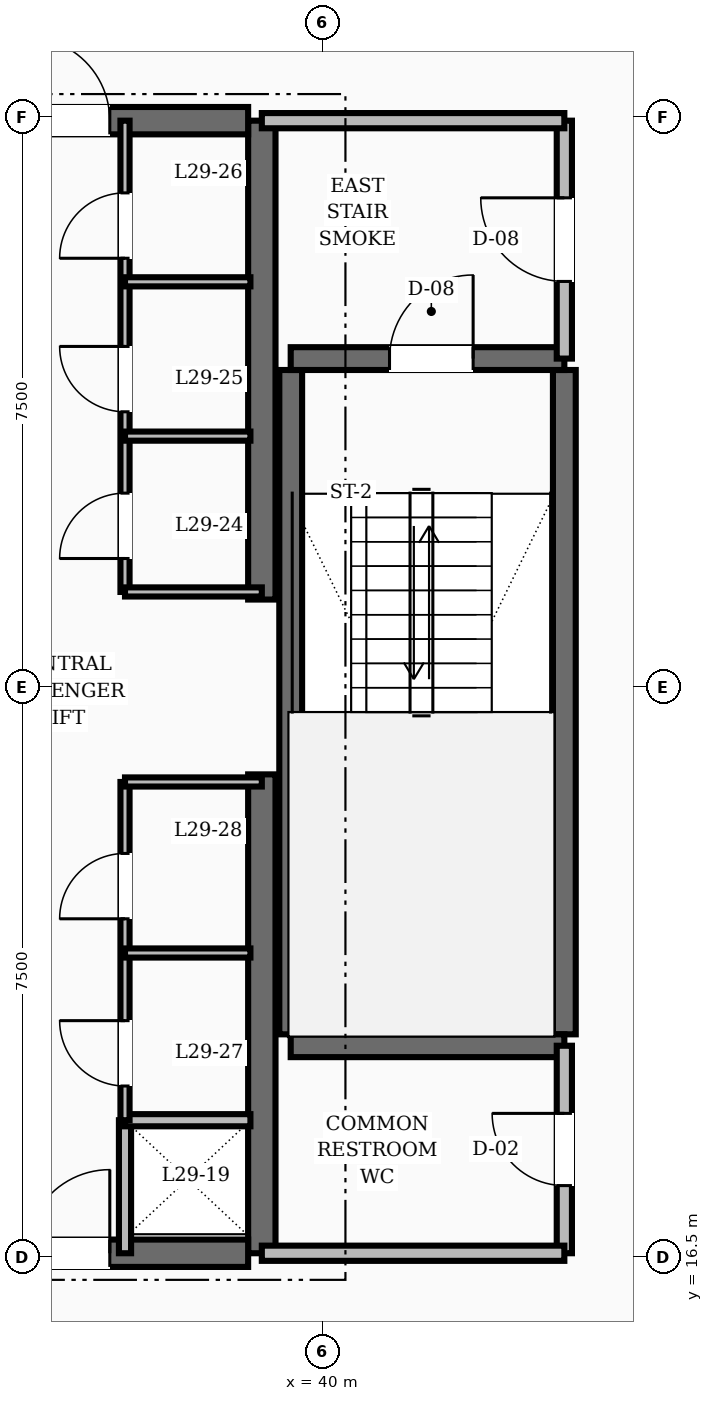
"""IFC4 building model, lengths in metres.
Left out: names, types, materials, properties, quantities, classifications, styles, units other than length and angle.
Written with IfcOpenShell. Run it as: python <this file> out.ifc"""

import sys

from ifc_helpers import new_model, si_unit, direction, frame, frame_2d, origin, place, context, subcontext, project, spatial, rectangle, extrude, element, fill, save


model = new_model("IFC4")
c1 = context("Model", 3, precision=1e-05, world=origin(), true_north=direction((0.0, 1.0)))
c2 = subcontext(c1, "Body", "Model", "MODEL_VIEW")
j1 = project(units=[si_unit("LENGTHUNIT", "METRE"), si_unit("PLANEANGLEUNIT", "RADIAN")], contexts=[c1])
p1 = place(None, origin())
s1 = spatial("IfcSite", under=j1, at=p1, CompositionType="ELEMENT")
p2 = place(p1, origin())
s2 = spatial("IfcBuilding", under=s1, at=p2, CompositionType="ELEMENT")
p3 = place(p2, frame((0.0, 0.0, 117.2)))
s3 = spatial("IfcBuildingStorey", under=s2, at=p3, CompositionType="ELEMENT", Elevation=117.2)
for number, where, z_axis, x_axis in (
    (1, (39.2, 16.55, 0.0), (0.0, 0.0, 1.0), (0.0, 1.0, 0.0)),
    (2, (39.2, 25.15, 0.0), (0.0, 0.0, 1.0), (0.0, 1.0, 0.0)),
):
    element("IfcWall", number, at=place(p3, frame(where, z_axis=z_axis, x_axis=x_axis)), inside=s3, PredefinedType="SHEAR", context=c2, shape_type="SweptSolid", body=[
        extrude(rectangle(XDim=6.3, YDim=0.36, at=frame_2d((3.15, 0.0))), origin(), (0.0, 0.0, 1.0), 3.6),
    ])
p4 = place(p3, frame((35.8, 16.55, 0.0), z_axis=(0.0, 0.0, 1.0), x_axis=(1.0, 0.0, 0.0)))
e3 = element("IfcWall", 3, at=p4, inside=s3, PredefinedType="SHEAR", context=c2, shape_type="SweptSolid", body=[
    extrude(rectangle(XDim=3.22, YDim=0.36, at=frame_2d((1.61, 0.0))), origin(), (0.0, 0.0, 1.0), 3.6),
])
p5 = place(p4, frame((0.3, 0.0, 0.0)))
e4 = element("IfcOpeningElement", 4, at=p5, cuts=e3, PredefinedType="OPENING", context=c2, shape_type="SweptSolid", body=[
    extrude(rectangle(XDim=1.1, YDim=2.1, at=frame_2d((0.55, 1.05))), frame((0.0, 0.19, 0.0), z_axis=(0.0, -1.0, 0.0), x_axis=(1.0, 0.0, 0.0)), (0.0, 0.0, 1.0), 0.38),
])
p6 = place(p3, frame((35.8, 31.45, 0.0), z_axis=(0.0, 0.0, 1.0), x_axis=(1.0, 0.0, 0.0)))
e5 = element("IfcWall", 5, at=p6, inside=s3, PredefinedType="SHEAR", context=c2, shape_type="SweptSolid", body=[
    extrude(rectangle(XDim=3.22, YDim=0.36, at=frame_2d((1.61, 0.0))), origin(), (0.0, 0.0, 1.0), 3.6),
])
p7 = place(p6, frame((0.3, 0.0, 0.0)))
e6 = element("IfcOpeningElement", 6, at=p7, cuts=e5, PredefinedType="OPENING", context=c2, shape_type="SweptSolid", body=[
    extrude(rectangle(XDim=1.1, YDim=2.1, at=frame_2d((0.55, 1.05))), frame((0.0, 0.19, 0.0), z_axis=(0.0, -1.0, 0.0), x_axis=(1.0, 0.0, 0.0)), (0.0, 0.0, 1.0), 0.38),
])
for number, where, z_axis, x_axis in (
    (7, (43.18, 19.43, 0.0), (0.0, 0.0, 1.0), (0.0, 1.0, 0.0)),
    (8, (39.58, 19.43, 0.0), (0.0, 0.0, 1.0), (0.0, 1.0, 0.0)),
):
    element("IfcWall", number, at=place(p3, frame(where, z_axis=z_axis, x_axis=x_axis)), inside=s3, PredefinedType="SHEAR", context=c2, shape_type="SweptSolid", body=[
        extrude(rectangle(XDim=8.74, YDim=0.3, at=frame_2d((4.37, 0.0))), origin(), (0.0, 0.0, 1.0), 3.6),
    ])
p8 = place(p3, frame((39.58, 19.28, 0.0), z_axis=(0.0, 0.0, 1.0), x_axis=(1.0, 0.0, 0.0)))
e9 = element("IfcWall", 9, at=p8, inside=s3, PredefinedType="SHEAR", context=c2, shape_type="SweptSolid", body=[
    extrude(rectangle(XDim=3.6, YDim=0.3, at=frame_2d((1.8, 0.0))), origin(), (0.0, 0.0, 1.0), 3.6),
])
p9 = place(p3, frame((39.58, 28.32, 0.0), z_axis=(0.0, 0.0, 1.0), x_axis=(1.0, 0.0, 0.0)))
e10 = element("IfcWall", 10, at=p9, inside=s3, PredefinedType="SHEAR", context=c2, shape_type="SweptSolid", body=[
    extrude(rectangle(XDim=3.6, YDim=0.3, at=frame_2d((1.8, 0.0))), origin(), (0.0, 0.0, 1.0), 3.6),
])
p10 = place(p9, frame((1.3, 0.0, 0.0)))
e11 = element("IfcOpeningElement", 11, at=p10, cuts=e10, PredefinedType="OPENING", context=c2, shape_type="SweptSolid", body=[
    extrude(rectangle(XDim=1.1, YDim=2.1, at=frame_2d((0.55, 1.05))), frame((0.0, 0.16, 0.0), z_axis=(0.0, -1.0, 0.0), x_axis=(1.0, 0.0, 0.0)), (0.0, 0.0, 1.0), 0.32),
])
p11 = place(p3, frame((43.18, 28.32, 0.0), z_axis=(0.0, 0.0, 1.0), x_axis=(0.0, 1.0, 0.0)))
e12 = element("IfcWall", 12, at=p11, inside=s3, PredefinedType="SOLIDWALL", context=c2, shape_type="SweptSolid", body=[
    extrude(rectangle(XDim=3.13, YDim=0.2, at=frame_2d((1.565, 0.0))), origin(), (0.0, 0.0, 1.0), 2.8),
])
p12 = place(p11, frame((1.015, 0.0, 0.0)))
e13 = element("IfcOpeningElement", 13, at=p12, cuts=e12, PredefinedType="OPENING", context=c2, shape_type="SweptSolid", body=[
    extrude(rectangle(XDim=1.1, YDim=2.1, at=frame_2d((0.55, 1.05))), frame((0.0, 0.11, 0.0), z_axis=(0.0, -1.0, 0.0), x_axis=(1.0, 0.0, 0.0)), (0.0, 0.0, 1.0), 0.22),
])
p13 = place(p3, frame((39.2, 31.45, 0.0), z_axis=(0.0, 0.0, 1.0), x_axis=(1.0, 0.0, 0.0)))
e14 = element("IfcWall", 14, at=p13, inside=s3, PredefinedType="SOLIDWALL", context=c2, shape_type="SweptSolid", body=[
    extrude(rectangle(XDim=3.98, YDim=0.2, at=frame_2d((1.99, 0.0))), origin(), (0.0, 0.0, 1.0), 2.8),
])
p14 = place(p3, frame((43.18, 16.55, 0.0), z_axis=(0.0, 0.0, 1.0), x_axis=(0.0, 1.0, 0.0)))
e15 = element("IfcWall", 15, at=p14, inside=s3, PredefinedType="SOLIDWALL", context=c2, shape_type="SweptSolid", body=[
    extrude(rectangle(XDim=2.73, YDim=0.2, at=frame_2d((1.365, 0.0))), origin(), (0.0, 0.0, 1.0), 2.8),
])
p15 = place(p14, frame((0.89, 0.0, 0.0)))
e16 = element("IfcOpeningElement", 16, at=p15, cuts=e15, PredefinedType="OPENING", context=c2, shape_type="SweptSolid", body=[
    extrude(rectangle(XDim=0.95, YDim=2.1, at=frame_2d((0.475, 1.05))), frame((0.0, 0.11, 0.0), z_axis=(0.0, -1.0, 0.0), x_axis=(1.0, 0.0, 0.0)), (0.0, 0.0, 1.0), 0.22),
])
p16 = place(p3, frame((39.2, 16.55, 0.0), z_axis=(0.0, 0.0, 1.0), x_axis=(1.0, 0.0, 0.0)))
e17 = element("IfcWall", 17, at=p16, inside=s3, PredefinedType="SOLIDWALL", context=c2, shape_type="SweptSolid", body=[
    extrude(rectangle(XDim=3.98, YDim=0.2, at=frame_2d((1.99, 0.0))), origin(), (0.0, 0.0, 1.0), 2.8),
])
p17 = place(p3, frame((37.4, 16.55, 0.0), z_axis=(0.0, 0.0, 1.0), x_axis=(0.0, 1.0, 0.0)))
e18 = element("IfcWall", 18, at=p17, inside=s3, PredefinedType="SOLIDWALL", context=c2, shape_type="SweptSolid", body=[
    extrude(rectangle(XDim=1.75, YDim=0.16, at=frame_2d((0.875, 0.0))), origin(), (0.0, 0.0, 1.0), 2.8),
])
p18 = place(p3, frame((37.4, 18.3, 0.0), z_axis=(0.0, 0.0, 1.0), x_axis=(1.0, 0.0, 0.0)))
e19 = element("IfcWall", 19, at=p18, inside=s3, PredefinedType="SOLIDWALL", context=c2, shape_type="SweptSolid", body=[
    extrude(rectangle(XDim=1.65, YDim=0.16, at=frame_2d((0.825, 0.0))), origin(), (0.0, 0.0, 1.0), 2.8),
])
p19 = place(p3, frame((37.4, 25.25, 0.0), z_axis=(0.0, 0.0, 1.0), x_axis=(0.0, 1.0, 0.0)))
e20 = element("IfcWall", 20, at=p19, inside=s3, PredefinedType="PARTITIONING", context=c2, shape_type="SweptSolid", body=[
    extrude(rectangle(XDim=6.2, YDim=0.12, at=frame_2d((3.1, 0.0))), origin(), (0.0, 0.0, 1.0), 2.8),
])
p20 = place(p19, frame((0.44, 0.0, 0.0)))
e21 = element("IfcOpeningElement", 21, at=p20, cuts=e20, PredefinedType="OPENING", context=c2, shape_type="SweptSolid", body=[
    extrude(rectangle(XDim=0.86, YDim=2.1, at=frame_2d((0.43, 1.05))), frame((0.0, 0.07, 0.0), z_axis=(0.0, -1.0, 0.0), x_axis=(1.0, 0.0, 0.0)), (0.0, 0.0, 1.0), 0.14),
])
p21 = place(p19, frame((2.37, 0.0, 0.0)))
e22 = element("IfcOpeningElement", 22, at=p21, cuts=e20, PredefinedType="OPENING", context=c2, shape_type="SweptSolid", body=[
    extrude(rectangle(XDim=0.86, YDim=2.1, at=frame_2d((0.43, 1.05))), frame((0.0, 0.07, 0.0), z_axis=(0.0, -1.0, 0.0), x_axis=(1.0, 0.0, 0.0)), (0.0, 0.0, 1.0), 0.14),
])
p22 = place(p19, frame((4.39, 0.0, 0.0)))
e23 = element("IfcOpeningElement", 23, at=p22, cuts=e20, PredefinedType="OPENING", context=c2, shape_type="SweptSolid", body=[
    extrude(rectangle(XDim=0.86, YDim=2.1, at=frame_2d((0.43, 1.05))), frame((0.0, 0.07, 0.0), z_axis=(0.0, -1.0, 0.0), x_axis=(1.0, 0.0, 0.0)), (0.0, 0.0, 1.0), 0.14),
])
p23 = place(p3, frame((37.4, 25.25, 0.0), z_axis=(0.0, 0.0, 1.0), x_axis=(1.0, 0.0, 0.0)))
e24 = element("IfcWall", 24, at=p23, inside=s3, PredefinedType="PARTITIONING", context=c2, shape_type="SweptSolid", body=[
    extrude(rectangle(XDim=1.8, YDim=0.12, at=frame_2d((0.9, 0.0))), origin(), (0.0, 0.0, 1.0), 2.8),
])
p24 = place(p3, frame((37.4, 18.3, 0.0), z_axis=(0.0, 0.0, 1.0), x_axis=(0.0, 1.0, 0.0)))
e25 = element("IfcWall", 25, at=p24, inside=s3, PredefinedType="PARTITIONING", context=c2, shape_type="SweptSolid", body=[
    extrude(rectangle(XDim=4.45, YDim=0.12, at=frame_2d((2.225, 0.0))), origin(), (0.0, 0.0, 1.0), 2.8),
])
p25 = place(p24, frame((0.45, 0.0, 0.0)))
e26 = element("IfcOpeningElement", 26, at=p25, cuts=e25, PredefinedType="OPENING", context=c2, shape_type="SweptSolid", body=[
    extrude(rectangle(XDim=0.86, YDim=2.1, at=frame_2d((0.43, 1.05))), frame((0.0, 0.07, 0.0), z_axis=(0.0, -1.0, 0.0), x_axis=(1.0, 0.0, 0.0)), (0.0, 0.0, 1.0), 0.14),
])
p26 = place(p24, frame((2.65, 0.0, 0.0)))
e27 = element("IfcOpeningElement", 27, at=p26, cuts=e25, PredefinedType="OPENING", context=c2, shape_type="SweptSolid", body=[
    extrude(rectangle(XDim=0.86, YDim=2.1, at=frame_2d((0.43, 1.05))), frame((0.0, 0.07, 0.0), z_axis=(0.0, -1.0, 0.0), x_axis=(1.0, 0.0, 0.0)), (0.0, 0.0, 1.0), 0.14),
])
p27 = place(p3, frame((37.4, 22.75, 0.0), z_axis=(0.0, 0.0, 1.0), x_axis=(1.0, 0.0, 0.0)))
e28 = element("IfcWall", 28, at=p27, inside=s3, PredefinedType="PARTITIONING", context=c2, shape_type="SweptSolid", body=[
    extrude(rectangle(XDim=1.8, YDim=0.12, at=frame_2d((0.9, 0.0))), origin(), (0.0, 0.0, 1.0), 2.8),
])
for number, where, z_axis, x_axis in (
    (29, (37.4, 27.3, 0.0), (0.0, 0.0, 1.0), (1.0, 0.0, 0.0)),
    (30, (37.4, 29.33, 0.0), (0.0, 0.0, 1.0), (1.0, 0.0, 0.0)),
    (31, (37.4, 20.5, 0.0), (0.0, 0.0, 1.0), (1.0, 0.0, 0.0)),
):
    element("IfcWall", number, at=place(p3, frame(where, z_axis=z_axis, x_axis=x_axis)), inside=s3, PredefinedType="PARTITIONING", context=c2, shape_type="SweptSolid", body=[
        extrude(rectangle(XDim=1.65, YDim=0.12, at=frame_2d((0.825, 0.0))), origin(), (0.0, 0.0, 1.0), 2.8),
    ])
p28 = place(p10, origin())
e32 = element("IfcDoor", 32, at=p28, inside=s3, OperationType="SINGLE_SWING_RIGHT", PredefinedType="DOOR", context=c2, shape_type="SweptSolid", body=[
    extrude(rectangle(XDim=1.1, YDim=2.1, at=frame_2d((0.55, 1.05))), frame((0.0, 0.025, 0.0), z_axis=(0.0, -1.0, 0.0), x_axis=(1.0, 0.0, 0.0)), (0.0, 0.0, 1.0), 0.05),
])
fill(e11, e32)
p29 = place(p12, origin())
e33 = element("IfcDoor", 33, at=p29, inside=s3, OperationType="SINGLE_SWING_RIGHT", PredefinedType="DOOR", context=c2, shape_type="SweptSolid", body=[
    extrude(rectangle(XDim=1.1, YDim=2.1, at=frame_2d((0.55, 1.05))), frame((0.0, 0.025, 0.0), z_axis=(0.0, -1.0, 0.0), x_axis=(1.0, 0.0, 0.0)), (0.0, 0.0, 1.0), 0.05),
])
fill(e13, e33)
p30 = place(p15, origin())
e34 = element("IfcDoor", 34, at=p30, inside=s3, OperationType="SINGLE_SWING_RIGHT", PredefinedType="DOOR", context=c2, shape_type="SweptSolid", body=[
    extrude(rectangle(XDim=0.95, YDim=2.1, at=frame_2d((0.475, 1.05))), frame((0.0, 0.025, 0.0), z_axis=(0.0, -1.0, 0.0), x_axis=(1.0, 0.0, 0.0)), (0.0, 0.0, 1.0), 0.05),
])
fill(e16, e34)
p31 = place(p7, origin())
e35 = element("IfcDoor", 35, at=p31, inside=s3, OperationType="SINGLE_SWING_LEFT", PredefinedType="DOOR", context=c2, shape_type="SweptSolid", body=[
    extrude(rectangle(XDim=1.1, YDim=2.1, at=frame_2d((0.55, 1.05))), frame((0.0, 0.025, 0.0), z_axis=(0.0, -1.0, 0.0), x_axis=(1.0, 0.0, 0.0)), (0.0, 0.0, 1.0), 0.05),
])
fill(e6, e35)
p32 = place(p5, origin())
e36 = element("IfcDoor", 36, at=p32, inside=s3, OperationType="SINGLE_SWING_RIGHT", PredefinedType="DOOR", context=c2, shape_type="SweptSolid", body=[
    extrude(rectangle(XDim=1.1, YDim=2.1, at=frame_2d((0.55, 1.05))), frame((0.0, 0.025, 0.0), z_axis=(0.0, -1.0, 0.0), x_axis=(1.0, 0.0, 0.0)), (0.0, 0.0, 1.0), 0.05),
])
fill(e4, e36)
p33 = place(p20, origin())
e37 = element("IfcDoor", 37, at=p33, inside=s3, OperationType="SINGLE_SWING_LEFT", PredefinedType="DOOR", context=c2, shape_type="SweptSolid", body=[
    extrude(rectangle(XDim=0.86, YDim=2.1, at=frame_2d((0.43, 1.05))), frame((0.0, 0.025, 0.0), z_axis=(0.0, -1.0, 0.0), x_axis=(1.0, 0.0, 0.0)), (0.0, 0.0, 1.0), 0.05),
])
fill(e21, e37)
p34 = place(p21, origin())
e38 = element("IfcDoor", 38, at=p34, inside=s3, OperationType="SINGLE_SWING_RIGHT", PredefinedType="DOOR", context=c2, shape_type="SweptSolid", body=[
    extrude(rectangle(XDim=0.86, YDim=2.1, at=frame_2d((0.43, 1.05))), frame((0.0, 0.025, 0.0), z_axis=(0.0, -1.0, 0.0), x_axis=(1.0, 0.0, 0.0)), (0.0, 0.0, 1.0), 0.05),
])
fill(e22, e38)
p35 = place(p22, origin())
e39 = element("IfcDoor", 39, at=p35, inside=s3, OperationType="SINGLE_SWING_LEFT", PredefinedType="DOOR", context=c2, shape_type="SweptSolid", body=[
    extrude(rectangle(XDim=0.86, YDim=2.1, at=frame_2d((0.43, 1.05))), frame((0.0, 0.025, 0.0), z_axis=(0.0, -1.0, 0.0), x_axis=(1.0, 0.0, 0.0)), (0.0, 0.0, 1.0), 0.05),
])
fill(e23, e39)
p36 = place(p25, origin())
e40 = element("IfcDoor", 40, at=p36, inside=s3, OperationType="SINGLE_SWING_RIGHT", PredefinedType="DOOR", context=c2, shape_type="SweptSolid", body=[
    extrude(rectangle(XDim=0.86, YDim=2.1, at=frame_2d((0.43, 1.05))), frame((0.0, 0.025, 0.0), z_axis=(0.0, -1.0, 0.0), x_axis=(1.0, 0.0, 0.0)), (0.0, 0.0, 1.0), 0.05),
])
fill(e26, e40)
p37 = place(p26, origin())
e41 = element("IfcDoor", 41, at=p37, inside=s3, OperationType="SINGLE_SWING_LEFT", PredefinedType="DOOR", context=c2, shape_type="SweptSolid", body=[
    extrude(rectangle(XDim=0.86, YDim=2.1, at=frame_2d((0.43, 1.05))), frame((0.0, 0.025, 0.0), z_axis=(0.0, -1.0, 0.0), x_axis=(1.0, 0.0, 0.0)), (0.0, 0.0, 1.0), 0.05),
])
fill(e27, e41)
save(model, sys.argv[1])
